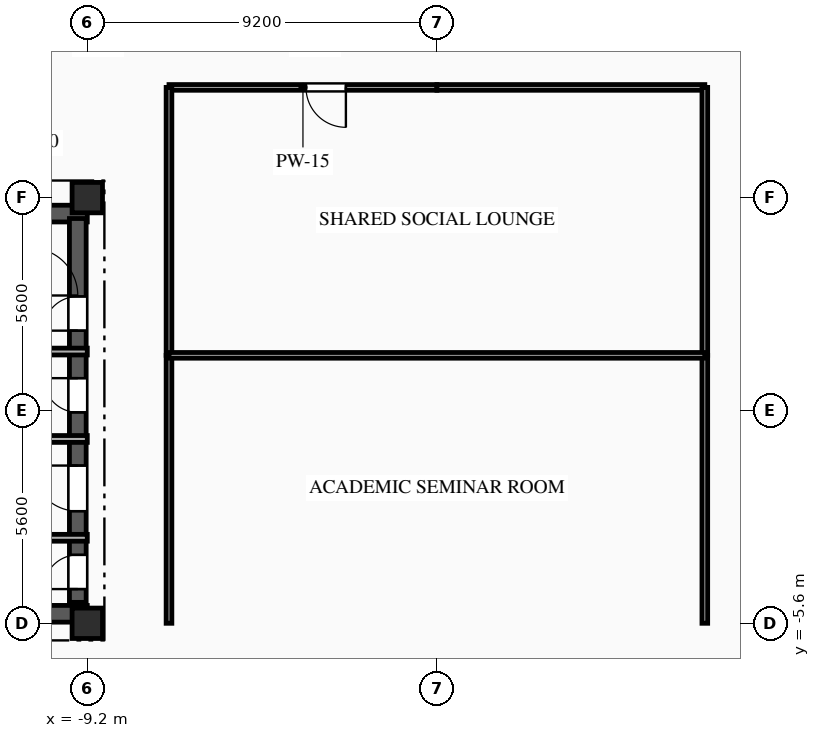
"""IFC4 building model, lengths in metres.
Left out: names, types, materials, properties, quantities, classifications, styles, units other than length and angle.
Written with IfcOpenShell. Run it as: python <this file> out.ifc"""

import sys

from ifc_helpers import new_model, si_unit, direction, frame, frame_2d, origin, origin_2d, place, context, subcontext, project, spatial, rectangle, extrude, element, fill, save


model = new_model("IFC4")
c1 = context("Model", 3, precision=1e-05, world=origin(), true_north=direction((0.0, 1.0)))
c2 = subcontext(c1, "Body", "Model", "MODEL_VIEW")
j1 = project(units=[si_unit("LENGTHUNIT", "METRE"), si_unit("PLANEANGLEUNIT", "RADIAN")], contexts=[c1])
p1 = place(None, origin())
s1 = spatial("IfcSite", under=j1, at=p1, CompositionType="ELEMENT")
p2 = place(p1, origin())
s2 = spatial("IfcBuilding", under=s1, at=p2, CompositionType="ELEMENT")
p3 = place(p2, frame((0.0, 0.0, 258.45)))
s3 = spatial("IfcBuildingStorey", under=s2, at=p3, CompositionType="ELEMENT", Elevation=258.45)
for number, where, z_axis, x_axis in (
    (1, (-9.2, -5.6, 0.0), (0.0, 0.0, 1.0), (1.0, 0.0, 0.0)),
    (2, (-9.2, 5.6, 0.0), (0.0, 0.0, 1.0), (1.0, 0.0, 0.0)),
):
    element("IfcColumn", number, at=place(p3, frame(where, z_axis=z_axis, x_axis=x_axis)), inside=s3, PredefinedType="COLUMN", context=c2, shape_type="SweptSolid", body=[
        extrude(rectangle(XDim=0.8, YDim=0.8, at=origin_2d()), origin(), (0.0, 0.0, 1.0), 3.35),
    ])
p4 = place(p3, frame((-18.8, 5.18, 0.0), z_axis=(0.0, 0.0, 1.0), x_axis=(1.0, 0.0, 0.0)))
e3 = element("IfcWall", 3, at=p4, inside=s3, PredefinedType="SHEAR", context=c2, shape_type="SweptSolid", body=[
    extrude(rectangle(XDim=9.6, YDim=0.44, at=frame_2d((4.8, 0.0))), origin(), (0.0, 0.0, 1.0), 3.03),
])
p5 = place(p4, frame((1.55, 0.0, 0.0)))
e4 = element("IfcOpeningElement", 4, at=p5, cuts=e3, PredefinedType="OPENING", context=c2, shape_type="SweptSolid", body=[
    extrude(rectangle(XDim=1.1, YDim=2.15, at=frame_2d((0.55, 1.075))), frame((0.0, 0.23, 0.0), z_axis=(0.0, -1.0, 0.0), x_axis=(1.0, 0.0, 0.0)), (0.0, 0.0, 1.0), 0.46),
])
p6 = place(p4, frame((4.775, 0.0, 0.0)))
e5 = element("IfcOpeningElement", 5, at=p6, cuts=e3, PredefinedType="OPENING", context=c2, shape_type="SweptSolid", body=[
    extrude(rectangle(XDim=1.05, YDim=2.1, at=frame_2d((0.525, 1.05))), frame((0.0, 0.23, 0.0), z_axis=(0.0, -1.0, 0.0), x_axis=(1.0, 0.0, 0.0)), (0.0, 0.0, 1.0), 0.46),
])
p7 = place(p3, frame((-18.8, -5.35, 0.0), z_axis=(0.0, 0.0, 1.0), x_axis=(1.0, 0.0, 0.0)))
e6 = element("IfcWall", 6, at=p7, inside=s3, PredefinedType="SHEAR", context=c2, shape_type="SweptSolid", body=[
    extrude(rectangle(XDim=9.6, YDim=0.44, at=frame_2d((4.8, 0.0))), origin(), (0.0, 0.0, 1.0), 3.03),
])
p8 = place(p7, frame((1.05, 0.0, 0.0)))
e7 = element("IfcOpeningElement", 7, at=p8, cuts=e6, PredefinedType="OPENING", context=c2, shape_type="SweptSolid", body=[
    extrude(rectangle(XDim=0.9, YDim=2.1, at=frame_2d((0.45, 1.05))), frame((0.0, 0.23, 0.0), z_axis=(0.0, -1.0, 0.0), x_axis=(1.0, 0.0, 0.0)), (0.0, 0.0, 1.0), 0.46),
])
p9 = place(p3, frame((-9.45, -5.05, 0.0), z_axis=(0.0, 0.0, 1.0), x_axis=(0.0, 1.0, 0.0)))
e8 = element("IfcWall", 8, at=p9, inside=s3, PredefinedType="SHEAR", context=c2, shape_type="SweptSolid", body=[
    extrude(rectangle(XDim=10.1, YDim=0.44, at=frame_2d((5.05, 0.0))), origin(), (0.0, 0.0, 1.0), 3.03),
])
p10 = place(p9, frame((7.15, 0.0, 0.0)))
e9 = element("IfcOpeningElement", 9, at=p10, cuts=e8, PredefinedType="OPENING", context=c2, shape_type="SweptSolid", body=[
    extrude(rectangle(XDim=0.9, YDim=2.1, at=frame_2d((0.45, 1.05))), frame((0.0, 0.23, 0.0), z_axis=(0.0, -1.0, 0.0), x_axis=(1.0, 0.0, 0.0)), (0.0, 0.0, 1.0), 0.46),
])
p11 = place(p9, frame((2.4, 0.0, 0.0)))
e10 = element("IfcOpeningElement", 10, at=p11, cuts=e8, PredefinedType="OPENING", context=c2, shape_type="SweptSolid", body=[
    extrude(rectangle(XDim=1.2, YDim=2.15, at=frame_2d((0.6, 1.075))), frame((0.0, 0.23, 0.0), z_axis=(0.0, -1.0, 0.0), x_axis=(1.0, 0.0, 0.0)), (0.0, 0.0, 1.0), 0.46),
])
p12 = place(p9, frame((0.35, 0.0, 0.0)))
e11 = element("IfcOpeningElement", 11, at=p12, cuts=e8, PredefinedType="OPENING", context=c2, shape_type="SweptSolid", body=[
    extrude(rectangle(XDim=0.9, YDim=2.1, at=frame_2d((0.45, 1.05))), frame((0.0, 0.23, 0.0), z_axis=(0.0, -1.0, 0.0), x_axis=(1.0, 0.0, 0.0)), (0.0, 0.0, 1.0), 0.46),
])
p13 = place(p9, frame((5.0, 0.0, 0.0)))
e12 = element("IfcOpeningElement", 12, at=p13, cuts=e8, PredefinedType="OPENING", context=c2, shape_type="SweptSolid", body=[
    extrude(rectangle(XDim=0.9, YDim=2.1, at=frame_2d((0.45, 1.05))), frame((0.0, 0.23, 0.0), z_axis=(0.0, -1.0, 0.0), x_axis=(1.0, 0.0, 0.0)), (0.0, 0.0, 1.0), 0.46),
])
p14 = place(p3, frame((-10.7, 1.55, 0.0), z_axis=(0.0, 0.0, 1.0), x_axis=(1.0, 0.0, 0.0)))
e13 = element("IfcWall", 13, at=p14, inside=s3, PredefinedType="PARTITIONING", context=c2, shape_type="SweptSolid", body=[
    extrude(rectangle(XDim=1.5, YDim=0.18, at=frame_2d((0.75, 0.0))), origin(), (0.0, 0.0, 1.0), 3.03),
])
p15 = place(p3, frame((-15.05, -3.35, 0.0), z_axis=(0.0, 0.0, 1.0), x_axis=(1.0, 0.0, 0.0)))
e14 = element("IfcWall", 14, at=p15, inside=s3, PredefinedType="PARTITIONING", context=c2, shape_type="SweptSolid", body=[
    extrude(rectangle(XDim=5.85, YDim=0.18, at=frame_2d((2.925, 0.0))), origin(), (0.0, 0.0, 1.0), 2.745),
])
p16 = place(p3, frame((-9.2, -0.75, 0.0), z_axis=(0.0, 0.0, 1.0), x_axis=(-1.0, 0.0, 0.0)))
e15 = element("IfcWall", 15, at=p16, inside=s3, PredefinedType="PARTITIONING", context=c2, shape_type="SweptSolid", body=[
    extrude(rectangle(XDim=5.85, YDim=0.18, at=frame_2d((2.925, 0.0))), origin(), (0.0, 0.0, 1.0), 3.03),
])
p17 = place(p3, frame((0.0, 8.5, 0.0), z_axis=(0.0, 0.0, 1.0), x_axis=(-1.0, 0.0, 0.0)))
e16 = element("IfcWall", 16, at=p17, inside=s3, PredefinedType="PARTITIONING", context=c2, shape_type="SweptSolid", body=[
    extrude(rectangle(XDim=7.05, YDim=0.15, at=frame_2d((3.525, 0.0))), origin(), (0.0, 0.0, 1.0), 3.03),
])
p18 = place(p17, frame((2.395, 0.0, 0.0)))
e17 = element("IfcOpeningElement", 17, at=p18, cuts=e16, PredefinedType="OPENING", context=c2, shape_type="SweptSolid", body=[
    extrude(rectangle(XDim=1.05, YDim=2.15, at=frame_2d((0.525, 1.075))), frame((0.0, 0.085, 0.0), z_axis=(0.0, -1.0, 0.0), x_axis=(1.0, 0.0, 0.0)), (0.0, 0.0, 1.0), 0.17),
])
for number, where, z_axis, x_axis in (
    (18, (7.05, 8.5, 0.0), (0.0, 0.0, 1.0), (-1.0, 0.0, 0.0)),
    (19, (-7.05, 1.45, 0.0), (0.0, 0.0, 1.0), (0.0, -1.0, 0.0)),
    (20, (-7.05, 8.5, 0.0), (0.0, 0.0, 1.0), (0.0, -1.0, 0.0)),
    (21, (7.05, -5.6, 0.0), (0.0, 0.0, 1.0), (0.0, 1.0, 0.0)),
    (22, (7.05, 1.45, 0.0), (0.0, 0.0, 1.0), (0.0, 1.0, 0.0)),
):
    element("IfcWall", number, at=place(p3, frame(where, z_axis=z_axis, x_axis=x_axis)), inside=s3, PredefinedType="PARTITIONING", context=c2, shape_type="SweptSolid", body=[
        extrude(rectangle(XDim=7.05, YDim=0.15, at=frame_2d((3.525, 0.0))), origin(), (0.0, 0.0, 1.0), 3.03),
    ])
p19 = place(p3, frame((-7.05, 1.45, 0.0), z_axis=(0.0, 0.0, 1.0), x_axis=(1.0, 0.0, 0.0)))
e23 = element("IfcWall", 23, at=p19, inside=s3, PredefinedType="PARTITIONING", context=c2, shape_type="SweptSolid", body=[
    extrude(rectangle(XDim=14.1, YDim=0.15, at=frame_2d((7.05, 0.0))), origin(), (0.0, 0.0, 1.0), 3.03),
])
p20 = place(p10, origin())
e24 = element("IfcDoor", 24, at=p20, inside=s3, OperationType="SINGLE_SWING_LEFT", PredefinedType="DOOR", context=c2, shape_type="SweptSolid", body=[
    extrude(rectangle(XDim=0.9, YDim=2.1, at=frame_2d((0.45, 1.05))), frame((0.0, 0.025, 0.0), z_axis=(0.0, -1.0, 0.0), x_axis=(1.0, 0.0, 0.0)), (0.0, 0.0, 1.0), 0.05),
])
fill(e9, e24)
p21 = place(p11, origin())
e25 = element("IfcDoor", 25, at=p21, inside=s3, OperationType="SINGLE_SWING_RIGHT", PredefinedType="DOOR", context=c2, shape_type="SweptSolid", body=[
    extrude(rectangle(XDim=1.2, YDim=2.15, at=frame_2d((0.6, 1.075))), frame((0.0, 0.025, 0.0), z_axis=(0.0, -1.0, 0.0), x_axis=(1.0, 0.0, 0.0)), (0.0, 0.0, 1.0), 0.05),
])
fill(e10, e25)
p22 = place(p12, origin())
e26 = element("IfcDoor", 26, at=p22, inside=s3, OperationType="SINGLE_SWING_LEFT", PredefinedType="DOOR", context=c2, shape_type="SweptSolid", body=[
    extrude(rectangle(XDim=0.9, YDim=2.1, at=frame_2d((0.45, 1.05))), frame((0.0, 0.025, 0.0), z_axis=(0.0, -1.0, 0.0), x_axis=(1.0, 0.0, 0.0)), (0.0, 0.0, 1.0), 0.05),
])
fill(e11, e26)
p23 = place(p13, origin())
e27 = element("IfcDoor", 27, at=p23, inside=s3, OperationType="SINGLE_SWING_RIGHT", PredefinedType="DOOR", context=c2, shape_type="SweptSolid", body=[
    extrude(rectangle(XDim=0.9, YDim=2.1, at=frame_2d((0.45, 1.05))), frame((0.0, 0.025, 0.0), z_axis=(0.0, -1.0, 0.0), x_axis=(1.0, 0.0, 0.0)), (0.0, 0.0, 1.0), 0.05),
])
fill(e12, e27)
p24 = place(p18, origin())
e28 = element("IfcDoor", 28, at=p24, inside=s3, OperationType="SINGLE_SWING_LEFT", PredefinedType="DOOR", context=c2, shape_type="SweptSolid", body=[
    extrude(rectangle(XDim=1.05, YDim=2.15, at=frame_2d((0.525, 1.075))), frame((0.0, 0.025, 0.0), z_axis=(0.0, -1.0, 0.0), x_axis=(1.0, 0.0, 0.0)), (0.0, 0.0, 1.0), 0.05),
])
fill(e17, e28)
save(model, sys.argv[1])
